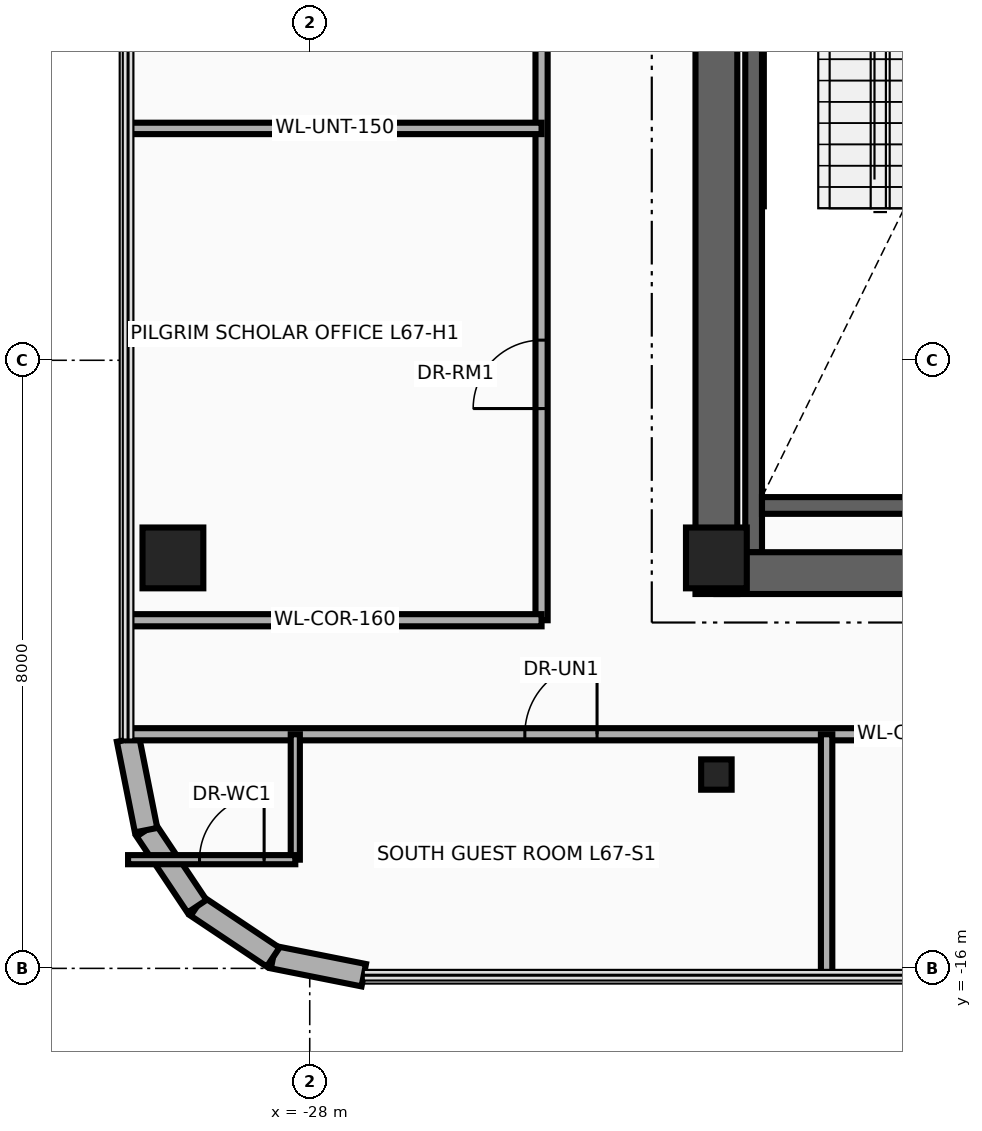
"""IFC4 building model, lengths in metres.
Left out: names, types, materials, properties, quantities, classifications, styles, units other than length and angle.
Written with IfcOpenShell. Run it as: python <this file> out.ifc"""

import sys

from ifc_helpers import new_model, si_unit, direction, frame, frame_2d, origin, origin_2d, place, context, subcontext, project, spatial, rectangle, i_section, extrude, source, transform, mapped, element, fill, save


model = new_model("IFC4")
c1 = context("Model", 3, precision=1e-05, world=origin(), true_north=direction((0.0, 1.0)))
c2 = subcontext(c1, "Body", "Model", "MODEL_VIEW")
j1 = project(units=[si_unit("LENGTHUNIT", "METRE"), si_unit("PLANEANGLEUNIT", "RADIAN")], contexts=[c1])
p1 = place(None, origin())
s1 = spatial("IfcSite", under=j1, at=p1, CompositionType="ELEMENT")
p2 = place(p1, origin())
s2 = spatial("IfcBuilding", under=s1, at=p2, CompositionType="ELEMENT")
p3 = place(p2, frame((0.0, 0.0, 258.0)))
s3 = spatial("IfcBuildingStorey", under=s2, at=p3, CompositionType="ELEMENT", Elevation=258.0)
p4 = place(p3, frame((-22.16, -10.525, 0.0), z_axis=(0.0, 0.0, 1.0), x_axis=(0.0, 1.0, 0.0)))
e1 = element("IfcWall", 1, at=p4, inside=s3, PredefinedType="SHEAR", context=c2, shape_type="SweptSolid", body=[
    extrude(rectangle(XDim=8.745, YDim=0.22, at=frame_2d((4.373, 0.0))), origin(), (0.0, 0.0, 1.0), 3.26),
])
p5 = place(p3, frame((-22.05, -9.91, 0.0), z_axis=(0.0, 0.0, 1.0), x_axis=(1.0, 0.0, 0.0)))
e2 = element("IfcWall", 2, at=p5, inside=s3, PredefinedType="SHEAR", context=c2, shape_type="SweptSolid", body=[
    extrude(rectangle(XDim=3.11, YDim=0.22, at=frame_2d((1.555, 0.0))), origin(), (0.0, 0.0, 1.0), 3.26),
])
p6 = place(p3, frame((-22.65, -11.075, 0.0), z_axis=(0.0, 0.0, 1.0), x_axis=(0.0, 1.0, 0.0)))
e3 = element("IfcWall", 3, at=p6, inside=s3, PredefinedType="SHEAR", context=c2, shape_type="SweptSolid", body=[
    extrude(rectangle(XDim=22.15, YDim=0.55, at=frame_2d((11.075, 0.0))), origin(), (0.0, 0.0, 1.0), 3.26),
])
p7 = place(p3, frame((-22.65, -10.8, 0.0), z_axis=(0.0, 0.0, 1.0), x_axis=(1.0, 0.0, 0.0)))
e4 = element("IfcWall", 4, at=p7, inside=s3, PredefinedType="SHEAR", context=c2, shape_type="SweptSolid", body=[
    extrude(rectangle(XDim=10.25, YDim=0.55, at=frame_2d((5.125, 0.0))), origin(), (0.0, 0.0, 1.0), 3.26),
])
m1 = source(origin(), c2, "Body", "SweptSolid", [
    extrude(rectangle(XDim=0.8, YDim=0.8, at=origin_2d()), origin(), (0.0, 0.0, 1.0), 3.5),
])
for number, where, z_axis, x_axis in (
    (5, (-29.8, -10.6, 0.0), (0.0, 0.0, 1.0), (1.0, 0.0, 0.0)),
    (6, (-22.65, -10.6, 0.0), (0.0, 0.0, 1.0), (1.0, 0.0, 0.0)),
):
    element("IfcColumn", number, at=place(p3, frame(where, z_axis=z_axis, x_axis=x_axis)), inside=s3, PredefinedType="COLUMN", context=c2, shape_type="MappedRepresentation", body=[
        mapped(m1, transform((0.0, 0.0, 0.0), x_axis=(1.0, 0.0, 0.0), y_axis=(0.0, 1.0, 0.0), z_axis=(0.0, 0.0, 1.0), scale=1.0)),
    ])
m2 = source(origin(), c2, "Body", "SweptSolid", [
    extrude(i_section(OverallWidth=0.401, OverallDepth=0.399, WebThickness=0.025, FlangeThickness=0.04, at=origin_2d()), origin(), (0.0, 0.0, 1.0), 3.5),
])
p8 = place(p3, frame((-22.65, -13.45, 0.0), z_axis=(0.0, 0.0, 1.0), x_axis=(1.0, 0.0, 0.0)))
e7 = element("IfcColumn", 7, at=p8, inside=s3, PredefinedType="COLUMN", context=c2, shape_type="MappedRepresentation", body=[
    mapped(m2, transform((0.0, 0.0, 0.0), x_axis=(1.0, 0.0, 0.0), y_axis=(0.0, 1.0, 0.0), z_axis=(0.0, 0.0, 1.0), scale=1.0)),
])
p9 = place(p3, frame((-27.289, -16.09, 0.0), z_axis=(0.0, 0.0, 1.0), x_axis=(-0.980765602568, 0.195189223115, 0.0)))
e8 = element("IfcWall", 8, at=p9, inside=s3, PredefinedType="SOLIDWALL", context=c2, shape_type="SweptSolid", body=[
    extrude(rectangle(XDim=1.216, YDim=0.3, at=frame_2d((0.608, 0.0))), origin(), (0.0, 0.0, 1.0), 3.26),
])
for number, where, z_axis, x_axis in (
    (9, (-28.482, -15.853, 0.0), (0.0, 0.0, 1.0), (-0.831, 0.556, 0.0)),
    (10, (-29.483, -15.183, 0.0), (0.0, 0.0, 1.0), (-0.556, 0.831, 0.0)),
):
    element("IfcWall", number, at=place(p3, frame(where, z_axis=z_axis, x_axis=x_axis)), inside=s3, PredefinedType="SOLIDWALL", context=c2, shape_type="SweptSolid", body=[
        extrude(rectangle(XDim=1.205, YDim=0.3, at=frame_2d((0.603, 0.0))), origin(), (0.0, 0.0, 1.0), 3.26),
    ])
p10 = place(p3, frame((-30.153, -14.182, 0.0), z_axis=(0.0, 0.0, 1.0), x_axis=(-0.194996050505, 0.980804027463, 0.0)))
e11 = element("IfcWall", 11, at=p10, inside=s3, PredefinedType="SOLIDWALL", context=c2, shape_type="SweptSolid", body=[
    extrude(rectangle(XDim=1.216, YDim=0.3, at=frame_2d((0.608, 0.0))), origin(), (0.0, 0.0, 1.0), 3.26),
])
p11 = place(p3, frame((-24.95, -11.42, 0.0), z_axis=(0.0, 0.0, 1.0), x_axis=(0.0, 1.0, 0.0)))
e12 = element("IfcWall", 12, at=p11, inside=s3, PredefinedType="PARTITIONING", context=c2, shape_type="SweptSolid", body=[
    extrude(rectangle(XDim=20.22, YDim=0.16, at=frame_2d((10.11, 0.0))), origin(), (0.0, 0.0, 1.0), 2.623),
])
p12 = place(p11, frame((2.785, 0.0, 0.0)))
e13 = element("IfcOpeningElement", 13, at=p12, cuts=e12, PredefinedType="OPENING", context=c2, shape_type="SweptSolid", body=[
    extrude(rectangle(XDim=0.9, YDim=2.1, at=frame_2d((0.45, 1.05))), frame((0.0, 0.095, 0.0), z_axis=(0.0, -1.0, 0.0), x_axis=(1.0, 0.0, 0.0)), (0.0, 0.0, 1.0), 0.19),
])
p13 = place(p11, frame((9.256, 0.0, 0.0)))
e14 = element("IfcOpeningElement", 14, at=p13, cuts=e12, PredefinedType="OPENING", context=c2, shape_type="SweptSolid", body=[
    extrude(rectangle(XDim=0.9, YDim=2.1, at=frame_2d((0.45, 1.05))), frame((0.0, 0.095, 0.0), z_axis=(0.0, -1.0, 0.0), x_axis=(1.0, 0.0, 0.0)), (0.0, 0.0, 1.0), 0.19),
])
p14 = place(p11, frame((17.105, 0.0, 0.0)))
e15 = element("IfcOpeningElement", 15, at=p14, cuts=e12, PredefinedType="OPENING", context=c2, shape_type="SweptSolid", body=[
    extrude(rectangle(XDim=0.95, YDim=2.15, at=frame_2d((0.475, 1.075))), frame((0.0, 0.095, 0.0), z_axis=(0.0, -1.0, 0.0), x_axis=(1.0, 0.0, 0.0)), (0.0, 0.0, 1.0), 0.19),
])
p15 = place(p3, frame((-30.39, -4.949, 0.0), z_axis=(0.0, 0.0, 1.0), x_axis=(1.0, 0.0, 0.0)))
e16 = element("IfcWall", 16, at=p15, inside=s3, PredefinedType="PARTITIONING", context=c2, shape_type="SweptSolid", body=[
    extrude(rectangle(XDim=5.44, YDim=0.15, at=frame_2d((2.72, 0.0))), origin(), (0.0, 0.0, 1.0), 2.706),
])
p16 = place(p3, frame((-30.39, -12.92, 0.0), z_axis=(0.0, 0.0, 1.0), x_axis=(1.0, 0.0, 0.0)))
e17 = element("IfcWall", 17, at=p16, inside=s3, PredefinedType="PARTITIONING", context=c2, shape_type="SweptSolid", body=[
    extrude(rectangle(XDim=20.78, YDim=0.16, at=frame_2d((10.39, 0.0))), origin(), (0.0, 0.0, 1.0), 2.634),
])
p17 = place(p16, frame((5.22, 0.0, 0.0)))
e18 = element("IfcOpeningElement", 18, at=p17, cuts=e17, PredefinedType="OPENING", context=c2, shape_type="SweptSolid", body=[
    extrude(rectangle(XDim=0.95, YDim=2.15, at=frame_2d((0.475, 1.075))), frame((0.0, 0.095, 0.0), z_axis=(0.0, -1.0, 0.0), x_axis=(1.0, 0.0, 0.0)), (0.0, 0.0, 1.0), 0.19),
])
p18 = place(p16, frame((14.51, 0.0, 0.0)))
e19 = element("IfcOpeningElement", 19, at=p18, cuts=e17, PredefinedType="OPENING", context=c2, shape_type="SweptSolid", body=[
    extrude(rectangle(XDim=0.95, YDim=2.15, at=frame_2d((0.475, 1.075))), frame((0.0, 0.095, 0.0), z_axis=(0.0, -1.0, 0.0), x_axis=(1.0, 0.0, 0.0)), (0.0, 0.0, 1.0), 0.19),
])
p19 = place(p3, frame((-21.2, -16.09, 0.0), z_axis=(0.0, 0.0, 1.0), x_axis=(0.0, 1.0, 0.0)))
e20 = element("IfcWall", 20, at=p19, inside=s3, PredefinedType="PARTITIONING", context=c2, shape_type="SweptSolid", body=[
    extrude(rectangle(XDim=3.17, YDim=0.15, at=frame_2d((1.585, 0.0))), origin(), (0.0, 0.0, 1.0), 2.706),
])
p20 = place(p3, frame((-28.19, -14.57, 0.0), z_axis=(0.0, 0.0, 1.0), x_axis=(0.0, 1.0, 0.0)))
e21 = element("IfcWall", 21, at=p20, inside=s3, PredefinedType="PARTITIONING", context=c2, shape_type="SweptSolid", body=[
    extrude(rectangle(XDim=1.65, YDim=0.12, at=frame_2d((0.825, 0.0))), origin(), (0.0, 0.0, 1.0), 3.26),
])
p21 = place(p3, frame((-30.39, -14.57, 0.0), z_axis=(0.0, 0.0, 1.0), x_axis=(1.0, 0.0, 0.0)))
e22 = element("IfcWall", 22, at=p21, inside=s3, PredefinedType="PARTITIONING", context=c2, shape_type="SweptSolid", body=[
    extrude(rectangle(XDim=2.2, YDim=0.12, at=frame_2d((1.1, 0.0))), origin(), (0.0, 0.0, 1.0), 3.26),
])
p22 = place(p21, frame((0.94, 0.0, 0.0)))
e23 = element("IfcOpeningElement", 23, at=p22, cuts=e22, PredefinedType="OPENING", context=c2, shape_type="SweptSolid", body=[
    extrude(rectangle(XDim=0.85, YDim=2.1, at=frame_2d((0.425, 1.05))), frame((0.0, 0.075, 0.0), z_axis=(0.0, -1.0, 0.0), x_axis=(1.0, 0.0, 0.0)), (0.0, 0.0, 1.0), 0.15),
])
p23 = place(p3, frame((-30.39, -11.42, 0.0), z_axis=(0.0, 0.0, 1.0), x_axis=(1.0, 0.0, 0.0)))
e24 = element("IfcWall", 24, at=p23, inside=s3, PredefinedType="PARTITIONING", context=c2, shape_type="SweptSolid", body=[
    extrude(rectangle(XDim=5.44, YDim=0.16, at=frame_2d((2.72, 0.0))), origin(), (0.0, 0.0, 1.0), 3.26),
])
p24 = place(p12, origin())
e25 = element("IfcDoor", 25, at=p24, inside=s3, OperationType="SINGLE_SWING_RIGHT", PredefinedType="DOOR", context=c2, shape_type="SweptSolid", body=[
    extrude(rectangle(XDim=0.9, YDim=2.1, at=frame_2d((0.45, 1.05))), frame((0.0, 0.025, 0.0), z_axis=(0.0, -1.0, 0.0), x_axis=(1.0, 0.0, 0.0)), (0.0, 0.0, 1.0), 0.05),
])
fill(e13, e25)
p25 = place(p17, origin())
e26 = element("IfcDoor", 26, at=p25, inside=s3, OperationType="SINGLE_SWING_RIGHT", PredefinedType="DOOR", context=c2, shape_type="SweptSolid", body=[
    extrude(rectangle(XDim=0.95, YDim=2.15, at=frame_2d((0.475, 1.075))), frame((0.0, 0.025, 0.0), z_axis=(0.0, -1.0, 0.0), x_axis=(1.0, 0.0, 0.0)), (0.0, 0.0, 1.0), 0.05),
])
fill(e18, e26)
p26 = place(p22, origin())
e27 = element("IfcDoor", 27, at=p26, inside=s3, OperationType="SINGLE_SWING_LEFT", PredefinedType="DOOR", context=c2, shape_type="SweptSolid", body=[
    extrude(rectangle(XDim=0.85, YDim=2.1, at=frame_2d((0.425, 1.05))), frame((0.0, 0.025, 0.0), z_axis=(0.0, -1.0, 0.0), x_axis=(1.0, 0.0, 0.0)), (0.0, 0.0, 1.0), 0.05),
])
fill(e23, e27)
save(model, sys.argv[1])
